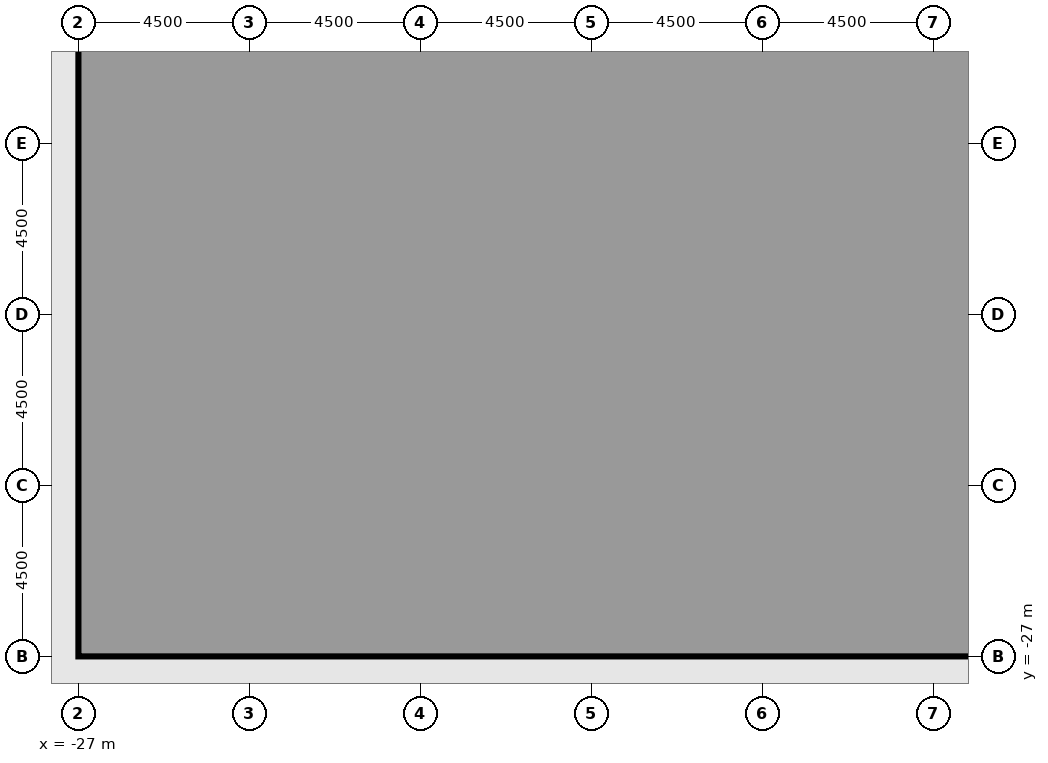
"""IFC4 building model, lengths in metres.
Left out: names, types, materials, properties, quantities, classifications, styles, units other than length and angle.
Written with IfcOpenShell. Run it as: python <this file> out.ifc"""

import sys

from ifc_helpers import new_model, si_unit, direction, frame, frame_2d, origin, origin_2d, place, context, subcontext, project, spatial, rectangle, extrude, element, fill, save


model = new_model("IFC4")
c1 = context("Model", 3, precision=1e-05, world=origin(), true_north=direction((0.0, 1.0)))
c2 = subcontext(c1, "Body", "Model", "MODEL_VIEW")
j1 = project(units=[si_unit("LENGTHUNIT", "METRE"), si_unit("PLANEANGLEUNIT", "RADIAN")], contexts=[c1])
p1 = place(None, origin())
s1 = spatial("IfcSite", under=j1, at=p1, CompositionType="ELEMENT")
p2 = place(p1, origin())
s2 = spatial("IfcBuilding", under=s1, at=p2, CompositionType="ELEMENT")
p3 = place(p2, frame((0.0, 0.0, 7.2)))
s3 = spatial("IfcBuildingStorey", under=s2, at=p3, CompositionType="ELEMENT", Elevation=7.2)
for number, where, z_axis, x_axis in (
    (1, (-27.0, -22.5, -0.45), (0.0, 0.0, 1.0), (1.0, 0.0, 0.0)),
    (2, (-27.0, -18.0, -0.45), (0.0, 0.0, 1.0), (1.0, 0.0, 0.0)),
    (3, (-27.0, -13.5, -0.45), (0.0, 0.0, 1.0), (1.0, 0.0, 0.0)),
    (4, (-22.5, -27.0, -0.45), (0.0, 0.0, 1.0), (1.0, 0.0, 0.0)),
    (5, (-18.0, -27.0, -0.45), (0.0, 0.0, 1.0), (1.0, 0.0, 0.0)),
    (6, (-13.5, -27.0, -0.45), (0.0, 0.0, 1.0), (1.0, 0.0, 0.0)),
    (7, (-9.0, -27.0, -0.45), (0.0, 0.0, 1.0), (1.0, 0.0, 0.0)),
    (8, (-4.5, -27.0, -0.45), (0.0, 0.0, 1.0), (1.0, 0.0, 0.0)),
):
    element("IfcColumn", number, at=place(p3, frame(where, z_axis=z_axis, x_axis=x_axis)), inside=s3, PredefinedType="COLUMN", context=c2, shape_type="SweptSolid", body=[
        extrude(rectangle(XDim=1.4, YDim=1.4, at=origin_2d()), origin(), (0.0, 0.0, 1.0), 4.55),
    ])
for number, where, z_axis, x_axis in (
    (9, (-18.0, -18.0, 0.0), (0.0, 0.0, 1.0), (1.0, 0.0, 0.0)),
    (10, (-9.0, -18.0, 0.0), (0.0, 0.0, 1.0), (1.0, 0.0, 0.0)),
):
    element("IfcColumn", number, at=place(p3, frame(where, z_axis=z_axis, x_axis=x_axis)), inside=s3, PredefinedType="COLUMN", context=c2, shape_type="SweptSolid", body=[
        extrude(rectangle(XDim=1.6, YDim=1.6, at=origin_2d()), origin(), (0.0, 0.0, 1.0), 4.1),
    ])
p4 = place(p3, frame((-18.7, -27.0, 0.0), z_axis=(0.0, 0.0, 1.0), x_axis=(-1.0, 0.0, 0.0)))
e11 = element("IfcWall", 11, at=p4, inside=s3, PredefinedType="SOLIDWALL", context=c2, shape_type="SweptSolid", body=[
    extrude(rectangle(XDim=3.1, YDim=0.3, at=frame_2d((1.55, 0.0))), origin(), (0.0, 0.0, 1.0), 2.75),
])
p5 = place(p4, frame((0.35, 0.0, 0.8)))
e12 = element("IfcOpeningElement", 12, at=p5, cuts=e11, PredefinedType="OPENING", context=c2, shape_type="SweptSolid", body=[
    extrude(rectangle(XDim=2.4, YDim=1.7, at=frame_2d((1.2, 0.85))), frame((0.0, 0.16, 0.0), z_axis=(0.0, -1.0, 0.0), x_axis=(1.0, 0.0, 0.0)), (0.0, 0.0, 1.0), 0.32),
])
p6 = place(p3, frame((-14.2, -27.0, 0.0), z_axis=(0.0, 0.0, 1.0), x_axis=(-1.0, 0.0, 0.0)))
e13 = element("IfcWall", 13, at=p6, inside=s3, PredefinedType="SOLIDWALL", context=c2, shape_type="SweptSolid", body=[
    extrude(rectangle(XDim=3.1, YDim=0.3, at=frame_2d((1.55, 0.0))), origin(), (0.0, 0.0, 1.0), 2.75),
])
p7 = place(p6, frame((1.05, 0.0, 0.0)))
e14 = element("IfcOpeningElement", 14, at=p7, cuts=e13, PredefinedType="OPENING", context=c2, shape_type="SweptSolid", body=[
    extrude(rectangle(XDim=1.0, YDim=2.2, at=frame_2d((0.5, 1.1))), frame((0.0, 0.16, 0.0), z_axis=(0.0, -1.0, 0.0), x_axis=(1.0, 0.0, 0.0)), (0.0, 0.0, 1.0), 0.32),
])
p8 = place(p3, frame((-9.7, -27.0, 0.0), z_axis=(0.0, 0.0, 1.0), x_axis=(-1.0, 0.0, 0.0)))
e15 = element("IfcWall", 15, at=p8, inside=s3, PredefinedType="SOLIDWALL", context=c2, shape_type="SweptSolid", body=[
    extrude(rectangle(XDim=3.1, YDim=0.3, at=frame_2d((1.55, 0.0))), origin(), (0.0, 0.0, 1.0), 2.75),
])
p9 = place(p8, frame((0.35, 0.0, 0.8)))
e16 = element("IfcOpeningElement", 16, at=p9, cuts=e15, PredefinedType="OPENING", context=c2, shape_type="SweptSolid", body=[
    extrude(rectangle(XDim=2.4, YDim=1.7, at=frame_2d((1.2, 0.85))), frame((0.0, 0.16, 0.0), z_axis=(0.0, -1.0, 0.0), x_axis=(1.0, 0.0, 0.0)), (0.0, 0.0, 1.0), 0.32),
])
p10 = place(p3, frame((-5.2, -27.0, 0.0), z_axis=(0.0, 0.0, 1.0), x_axis=(-1.0, 0.0, 0.0)))
e17 = element("IfcWall", 17, at=p10, inside=s3, PredefinedType="SOLIDWALL", context=c2, shape_type="SweptSolid", body=[
    extrude(rectangle(XDim=3.1, YDim=0.3, at=frame_2d((1.55, 0.0))), origin(), (0.0, 0.0, 1.0), 2.75),
])
p11 = place(p10, frame((0.35, 0.0, 0.8)))
e18 = element("IfcOpeningElement", 18, at=p11, cuts=e17, PredefinedType="OPENING", context=c2, shape_type="SweptSolid", body=[
    extrude(rectangle(XDim=2.4, YDim=1.7, at=frame_2d((1.2, 0.85))), frame((0.0, 0.16, 0.0), z_axis=(0.0, -1.0, 0.0), x_axis=(1.0, 0.0, 0.0)), (0.0, 0.0, 1.0), 0.32),
])
p12 = place(p3, frame((-0.7, -27.0, 0.0), z_axis=(0.0, 0.0, 1.0), x_axis=(-1.0, 0.0, 0.0)))
e19 = element("IfcWall", 19, at=p12, inside=s3, PredefinedType="SOLIDWALL", context=c2, shape_type="SweptSolid", body=[
    extrude(rectangle(XDim=3.1, YDim=0.3, at=frame_2d((1.55, 0.0))), origin(), (0.0, 0.0, 1.0), 2.75),
])
p13 = place(p12, frame((0.35, 0.0, 0.8)))
e20 = element("IfcOpeningElement", 20, at=p13, cuts=e19, PredefinedType="OPENING", context=c2, shape_type="SweptSolid", body=[
    extrude(rectangle(XDim=2.4, YDim=1.7, at=frame_2d((1.2, 0.85))), frame((0.0, 0.16, 0.0), z_axis=(0.0, -1.0, 0.0), x_axis=(1.0, 0.0, 0.0)), (0.0, 0.0, 1.0), 0.32),
])
p14 = place(p3, frame((-27.0, -12.8, 0.0), z_axis=(0.0, 0.0, 1.0), x_axis=(0.0, 1.0, 0.0)))
e21 = element("IfcWall", 21, at=p14, inside=s3, PredefinedType="SOLIDWALL", context=c2, shape_type="SweptSolid", body=[
    extrude(rectangle(XDim=3.1, YDim=0.3, at=frame_2d((1.55, 0.0))), origin(), (0.0, 0.0, 1.0), 2.75),
])
p15 = place(p14, frame((1.425, 0.0, 0.8)))
e22 = element("IfcOpeningElement", 22, at=p15, cuts=e21, PredefinedType="OPENING", context=c2, shape_type="SweptSolid", body=[
    extrude(rectangle(XDim=1.2, YDim=1.7, at=frame_2d((0.6, 0.85))), frame((0.0, 0.16, 0.0), z_axis=(0.0, -1.0, 0.0), x_axis=(1.0, 0.0, 0.0)), (0.0, 0.0, 1.0), 0.32),
])
p16 = place(p3, frame((-27.0, -17.3, 0.0), z_axis=(0.0, 0.0, 1.0), x_axis=(0.0, 1.0, 0.0)))
e23 = element("IfcWall", 23, at=p16, inside=s3, PredefinedType="SOLIDWALL", context=c2, shape_type="SweptSolid", body=[
    extrude(rectangle(XDim=3.1, YDim=0.3, at=frame_2d((1.55, 0.0))), origin(), (0.0, 0.0, 1.0), 2.75),
])
p17 = place(p16, frame((1.05, 0.0, 0.0)))
e24 = element("IfcOpeningElement", 24, at=p17, cuts=e23, PredefinedType="OPENING", context=c2, shape_type="SweptSolid", body=[
    extrude(rectangle(XDim=1.0, YDim=2.2, at=frame_2d((0.5, 1.1))), frame((0.0, 0.16, 0.0), z_axis=(0.0, -1.0, 0.0), x_axis=(1.0, 0.0, 0.0)), (0.0, 0.0, 1.0), 0.32),
])
p18 = place(p3, frame((-27.0, -21.8, 0.0), z_axis=(0.0, 0.0, 1.0), x_axis=(0.0, 1.0, 0.0)))
e25 = element("IfcWall", 25, at=p18, inside=s3, PredefinedType="SOLIDWALL", context=c2, shape_type="SweptSolid", body=[
    extrude(rectangle(XDim=3.1, YDim=0.3, at=frame_2d((1.55, 0.0))), origin(), (0.0, 0.0, 1.0), 2.75),
])
p19 = place(p18, frame((0.35, 0.0, 0.8)))
e26 = element("IfcOpeningElement", 26, at=p19, cuts=e25, PredefinedType="OPENING", context=c2, shape_type="SweptSolid", body=[
    extrude(rectangle(XDim=2.4, YDim=1.7, at=frame_2d((1.2, 0.85))), frame((0.0, 0.16, 0.0), z_axis=(0.0, -1.0, 0.0), x_axis=(1.0, 0.0, 0.0)), (0.0, 0.0, 1.0), 0.32),
])
p20 = place(p3, frame((-23.094, -26.406, 0.0), z_axis=(0.0, 0.0, 1.0), x_axis=(-0.707106781187, 0.707106781187, 0.0)))
e27 = element("IfcWall", 27, at=p20, inside=s3, PredefinedType="SOLIDWALL", context=c2, shape_type="SweptSolid", body=[
    extrude(rectangle(XDim=4.684, YDim=0.3, at=frame_2d((2.342, 0.0))), origin(), (0.0, 0.0, 1.0), 2.75),
])
p21 = place(p20, frame((1.142, 0.0, 0.8)))
e28 = element("IfcOpeningElement", 28, at=p21, cuts=e27, PredefinedType="OPENING", context=c2, shape_type="SweptSolid", body=[
    extrude(rectangle(XDim=2.4, YDim=1.7, at=frame_2d((1.2, 0.85))), frame((0.0, 0.16, 0.0), z_axis=(0.0, -1.0, 0.0), x_axis=(1.0, 0.0, 0.0)), (0.0, 0.0, 1.0), 0.32),
])
p22 = place(p3, frame((-18.0, -26.3, 0.0), z_axis=(0.0, 0.0, 1.0), x_axis=(0.0, 1.0, 0.0)))
e29 = element("IfcWall", 29, at=p22, inside=s3, PredefinedType="PARTITIONING", context=c2, shape_type="SweptSolid", body=[
    extrude(rectangle(XDim=7.5, YDim=0.2, at=frame_2d((3.75, 0.0))), origin(), (0.0, 0.0, 1.0), 3.65),
])
p23 = place(p3, frame((-18.0, -17.2, 0.0), z_axis=(0.0, 0.0, 1.0), x_axis=(0.0, 1.0, 0.0)))
e30 = element("IfcWall", 30, at=p23, inside=s3, PredefinedType="PARTITIONING", context=c2, shape_type="SweptSolid", body=[
    extrude(rectangle(XDim=5.2, YDim=0.2, at=frame_2d((2.6, 0.0))), origin(), (0.0, 0.0, 1.0), 3.65),
])
p24 = place(p3, frame((-4.5, -26.3, 0.0), z_axis=(0.0, 0.0, 1.0), x_axis=(0.0, 1.0, 0.0)))
e31 = element("IfcWall", 31, at=p24, inside=s3, PredefinedType="PARTITIONING", context=c2, shape_type="SweptSolid", body=[
    extrude(rectangle(XDim=14.3, YDim=0.2, at=frame_2d((7.15, 0.0))), origin(), (0.0, 0.0, 1.0), 3.65),
])
p25 = place(p3, frame((-18.8, -18.3, 0.0), z_axis=(0.0, 0.0, 1.0), x_axis=(-1.0, 0.0, 0.0)))
e32 = element("IfcWall", 32, at=p25, inside=s3, PredefinedType="PARTITIONING", context=c2, shape_type="SweptSolid", body=[
    extrude(rectangle(XDim=7.5, YDim=0.15, at=frame_2d((3.75, 0.0))), origin(), (0.0, 0.0, 1.0), 3.65),
])
p26 = place(p25, frame((3.6, 0.0, 0.0)))
e33 = element("IfcOpeningElement", 33, at=p26, cuts=e32, PredefinedType="OPENING", context=c2, shape_type="SweptSolid", body=[
    extrude(rectangle(XDim=1.0, YDim=2.1, at=frame_2d((0.5, 1.05))), frame((0.0, 0.085, 0.0), z_axis=(0.0, -1.0, 0.0), x_axis=(1.0, 0.0, 0.0)), (0.0, 0.0, 1.0), 0.17),
])
p27 = place(p3, frame((-9.8, -18.3, 0.0), z_axis=(0.0, 0.0, 1.0), x_axis=(-1.0, 0.0, 0.0)))
e34 = element("IfcWall", 34, at=p27, inside=s3, PredefinedType="PARTITIONING", context=c2, shape_type="SweptSolid", body=[
    extrude(rectangle(XDim=7.4, YDim=0.15, at=frame_2d((3.7, 0.0))), origin(), (0.0, 0.0, 1.0), 3.65),
])
p28 = place(p27, frame((0.1, 0.0, 0.0)))
e35 = element("IfcOpeningElement", 35, at=p28, cuts=e34, PredefinedType="OPENING", context=c2, shape_type="SweptSolid", body=[
    extrude(rectangle(XDim=1.0, YDim=2.1, at=frame_2d((0.5, 1.05))), frame((0.0, 0.085, 0.0), z_axis=(0.0, -1.0, 0.0), x_axis=(1.0, 0.0, 0.0)), (0.0, 0.0, 1.0), 0.17),
])
p29 = place(p3, frame((-8.2, -18.3, 0.0), z_axis=(0.0, 0.0, 1.0), x_axis=(1.0, 0.0, 0.0)))
e36 = element("IfcWall", 36, at=p29, inside=s3, PredefinedType="PARTITIONING", context=c2, shape_type="SweptSolid", body=[
    extrude(rectangle(XDim=7.4, YDim=0.15, at=frame_2d((3.7, 0.0))), origin(), (0.0, 0.0, 1.0), 3.65),
])
p30 = place(p3, frame((26.85, -12.0, 0.0), z_axis=(0.0, 0.0, 1.0), x_axis=(-1.0, 0.0, 0.0)))
e37 = element("IfcWall", 37, at=p30, inside=s3, PredefinedType="PARTITIONING", context=c2, shape_type="SweptSolid", body=[
    extrude(rectangle(XDim=53.7, YDim=0.2, at=frame_2d((26.85, 0.0))), origin(), (0.0, 0.0, 1.0), 3.65),
])
p31 = place(p30, frame((47.75, 0.0, 0.0)))
e38 = element("IfcOpeningElement", 38, at=p31, cuts=e37, PredefinedType="OPENING", context=c2, shape_type="SweptSolid", body=[
    extrude(rectangle(XDim=1.0, YDim=2.1, at=frame_2d((0.5, 1.05))), frame((0.0, 0.11, 0.0), z_axis=(0.0, -1.0, 0.0), x_axis=(1.0, 0.0, 0.0)), (0.0, 0.0, 1.0), 0.22),
])
p32 = place(p30, frame((35.75, 0.0, 0.0)))
e39 = element("IfcOpeningElement", 39, at=p32, cuts=e37, PredefinedType="OPENING", context=c2, shape_type="SweptSolid", body=[
    extrude(rectangle(XDim=1.0, YDim=2.1, at=frame_2d((0.5, 1.05))), frame((0.0, 0.11, 0.0), z_axis=(0.0, -1.0, 0.0), x_axis=(1.0, 0.0, 0.0)), (0.0, 0.0, 1.0), 0.22),
])
p33 = place(p30, frame((25.5, 0.0, 0.0)))
e40 = element("IfcOpeningElement", 40, at=p33, cuts=e37, PredefinedType="OPENING", context=c2, shape_type="SweptSolid", body=[
    extrude(rectangle(XDim=1.0, YDim=2.1, at=frame_2d((0.5, 1.05))), frame((0.0, 0.11, 0.0), z_axis=(0.0, -1.0, 0.0), x_axis=(1.0, 0.0, 0.0)), (0.0, 0.0, 1.0), 0.22),
])
p34 = place(p30, frame((18.25, 0.0, 0.0)))
e41 = element("IfcOpeningElement", 41, at=p34, cuts=e37, PredefinedType="OPENING", context=c2, shape_type="SweptSolid", body=[
    extrude(rectangle(XDim=1.0, YDim=2.1, at=frame_2d((0.5, 1.05))), frame((0.0, 0.11, 0.0), z_axis=(0.0, -1.0, 0.0), x_axis=(1.0, 0.0, 0.0)), (0.0, 0.0, 1.0), 0.22),
])
p35 = place(p30, frame((10.25, 0.0, 0.0)))
e42 = element("IfcOpeningElement", 42, at=p35, cuts=e37, PredefinedType="OPENING", context=c2, shape_type="SweptSolid", body=[
    extrude(rectangle(XDim=1.0, YDim=2.1, at=frame_2d((0.5, 1.05))), frame((0.0, 0.11, 0.0), z_axis=(0.0, -1.0, 0.0), x_axis=(1.0, 0.0, 0.0)), (0.0, 0.0, 1.0), 0.22),
])
p36 = place(p30, frame((3.0, 0.0, 0.0)))
e43 = element("IfcOpeningElement", 43, at=p36, cuts=e37, PredefinedType="OPENING", context=c2, shape_type="SweptSolid", body=[
    extrude(rectangle(XDim=1.0, YDim=2.1, at=frame_2d((0.5, 1.05))), frame((0.0, 0.11, 0.0), z_axis=(0.0, -1.0, 0.0), x_axis=(1.0, 0.0, 0.0)), (0.0, 0.0, 1.0), 0.22),
])
p37 = place(p5, origin())
e44 = element("IfcWindow", 44, at=p37, inside=s3, PartitioningType="SINGLE_PANEL", PredefinedType="WINDOW", context=c2, shape_type="SweptSolid", body=[
    extrude(rectangle(XDim=2.4, YDim=1.7, at=frame_2d((1.2, 0.85))), frame((0.0, 0.03, 0.0), z_axis=(0.0, -1.0, 0.0), x_axis=(1.0, 0.0, 0.0)), (0.0, 0.0, 1.0), 0.06),
])
fill(e12, e44)
p38 = place(p7, origin())
e45 = element("IfcDoor", 45, at=p38, inside=s3, OperationType="SINGLE_SWING_LEFT", PredefinedType="DOOR", context=c2, shape_type="SweptSolid", body=[
    extrude(rectangle(XDim=1.0, YDim=2.2, at=frame_2d((0.5, 1.1))), frame((0.0, 0.025, 0.0), z_axis=(0.0, -1.0, 0.0), x_axis=(1.0, 0.0, 0.0)), (0.0, 0.0, 1.0), 0.05),
])
fill(e14, e45)
p39 = place(p9, origin())
e46 = element("IfcWindow", 46, at=p39, inside=s3, PartitioningType="SINGLE_PANEL", PredefinedType="WINDOW", context=c2, shape_type="SweptSolid", body=[
    extrude(rectangle(XDim=2.4, YDim=1.7, at=frame_2d((1.2, 0.85))), frame((0.0, 0.03, 0.0), z_axis=(0.0, -1.0, 0.0), x_axis=(1.0, 0.0, 0.0)), (0.0, 0.0, 1.0), 0.06),
])
fill(e16, e46)
p40 = place(p11, origin())
e47 = element("IfcWindow", 47, at=p40, inside=s3, PartitioningType="SINGLE_PANEL", PredefinedType="WINDOW", context=c2, shape_type="SweptSolid", body=[
    extrude(rectangle(XDim=2.4, YDim=1.7, at=frame_2d((1.2, 0.85))), frame((0.0, 0.03, 0.0), z_axis=(0.0, -1.0, 0.0), x_axis=(1.0, 0.0, 0.0)), (0.0, 0.0, 1.0), 0.06),
])
fill(e18, e47)
p41 = place(p15, origin())
e48 = element("IfcWindow", 48, at=p41, inside=s3, PartitioningType="SINGLE_PANEL", PredefinedType="WINDOW", context=c2, shape_type="SweptSolid", body=[
    extrude(rectangle(XDim=1.2, YDim=1.7, at=frame_2d((0.6, 0.85))), frame((0.0, 0.03, 0.0), z_axis=(0.0, -1.0, 0.0), x_axis=(1.0, 0.0, 0.0)), (0.0, 0.0, 1.0), 0.06),
])
fill(e22, e48)
p42 = place(p17, origin())
e49 = element("IfcDoor", 49, at=p42, inside=s3, OperationType="SINGLE_SWING_RIGHT", PredefinedType="DOOR", context=c2, shape_type="SweptSolid", body=[
    extrude(rectangle(XDim=1.0, YDim=2.2, at=frame_2d((0.5, 1.1))), frame((0.0, 0.025, 0.0), z_axis=(0.0, -1.0, 0.0), x_axis=(1.0, 0.0, 0.0)), (0.0, 0.0, 1.0), 0.05),
])
fill(e24, e49)
p43 = place(p19, origin())
e50 = element("IfcWindow", 50, at=p43, inside=s3, PartitioningType="SINGLE_PANEL", PredefinedType="WINDOW", context=c2, shape_type="SweptSolid", body=[
    extrude(rectangle(XDim=2.4, YDim=1.7, at=frame_2d((1.2, 0.85))), frame((0.0, 0.03, 0.0), z_axis=(0.0, -1.0, 0.0), x_axis=(1.0, 0.0, 0.0)), (0.0, 0.0, 1.0), 0.06),
])
fill(e26, e50)
p44 = place(p21, origin())
e51 = element("IfcWindow", 51, at=p44, inside=s3, PartitioningType="SINGLE_PANEL", PredefinedType="WINDOW", context=c2, shape_type="SweptSolid", body=[
    extrude(rectangle(XDim=2.4, YDim=1.7, at=frame_2d((1.2, 0.85))), frame((0.0, 0.03, 0.0), z_axis=(0.0, -1.0, 0.0), x_axis=(1.0, 0.0, 0.0)), (0.0, 0.0, 1.0), 0.06),
])
fill(e28, e51)
p45 = place(p26, origin())
e52 = element("IfcDoor", 52, at=p45, inside=s3, OperationType="SINGLE_SWING_RIGHT", PredefinedType="DOOR", context=c2, shape_type="SweptSolid", body=[
    extrude(rectangle(XDim=1.0, YDim=2.1, at=frame_2d((0.5, 1.05))), frame((0.0, 0.025, 0.0), z_axis=(0.0, -1.0, 0.0), x_axis=(1.0, 0.0, 0.0)), (0.0, 0.0, 1.0), 0.05),
])
fill(e33, e52)
p46 = place(p28, origin())
e53 = element("IfcDoor", 53, at=p46, inside=s3, OperationType="SINGLE_SWING_LEFT", PredefinedType="DOOR", context=c2, shape_type="SweptSolid", body=[
    extrude(rectangle(XDim=1.0, YDim=2.1, at=frame_2d((0.5, 1.05))), frame((0.0, 0.025, 0.0), z_axis=(0.0, -1.0, 0.0), x_axis=(1.0, 0.0, 0.0)), (0.0, 0.0, 1.0), 0.05),
])
fill(e35, e53)
p47 = place(p31, origin())
e54 = element("IfcDoor", 54, at=p47, inside=s3, OperationType="SINGLE_SWING_RIGHT", PredefinedType="DOOR", context=c2, shape_type="SweptSolid", body=[
    extrude(rectangle(XDim=1.0, YDim=2.1, at=frame_2d((0.5, 1.05))), frame((0.0, 0.025, 0.0), z_axis=(0.0, -1.0, 0.0), x_axis=(1.0, 0.0, 0.0)), (0.0, 0.0, 1.0), 0.05),
])
fill(e38, e54)
p48 = place(p32, origin())
e55 = element("IfcDoor", 55, at=p48, inside=s3, OperationType="SINGLE_SWING_RIGHT", PredefinedType="DOOR", context=c2, shape_type="SweptSolid", body=[
    extrude(rectangle(XDim=1.0, YDim=2.1, at=frame_2d((0.5, 1.05))), frame((0.0, 0.025, 0.0), z_axis=(0.0, -1.0, 0.0), x_axis=(1.0, 0.0, 0.0)), (0.0, 0.0, 1.0), 0.05),
])
fill(e39, e55)
save(model, sys.argv[1])
